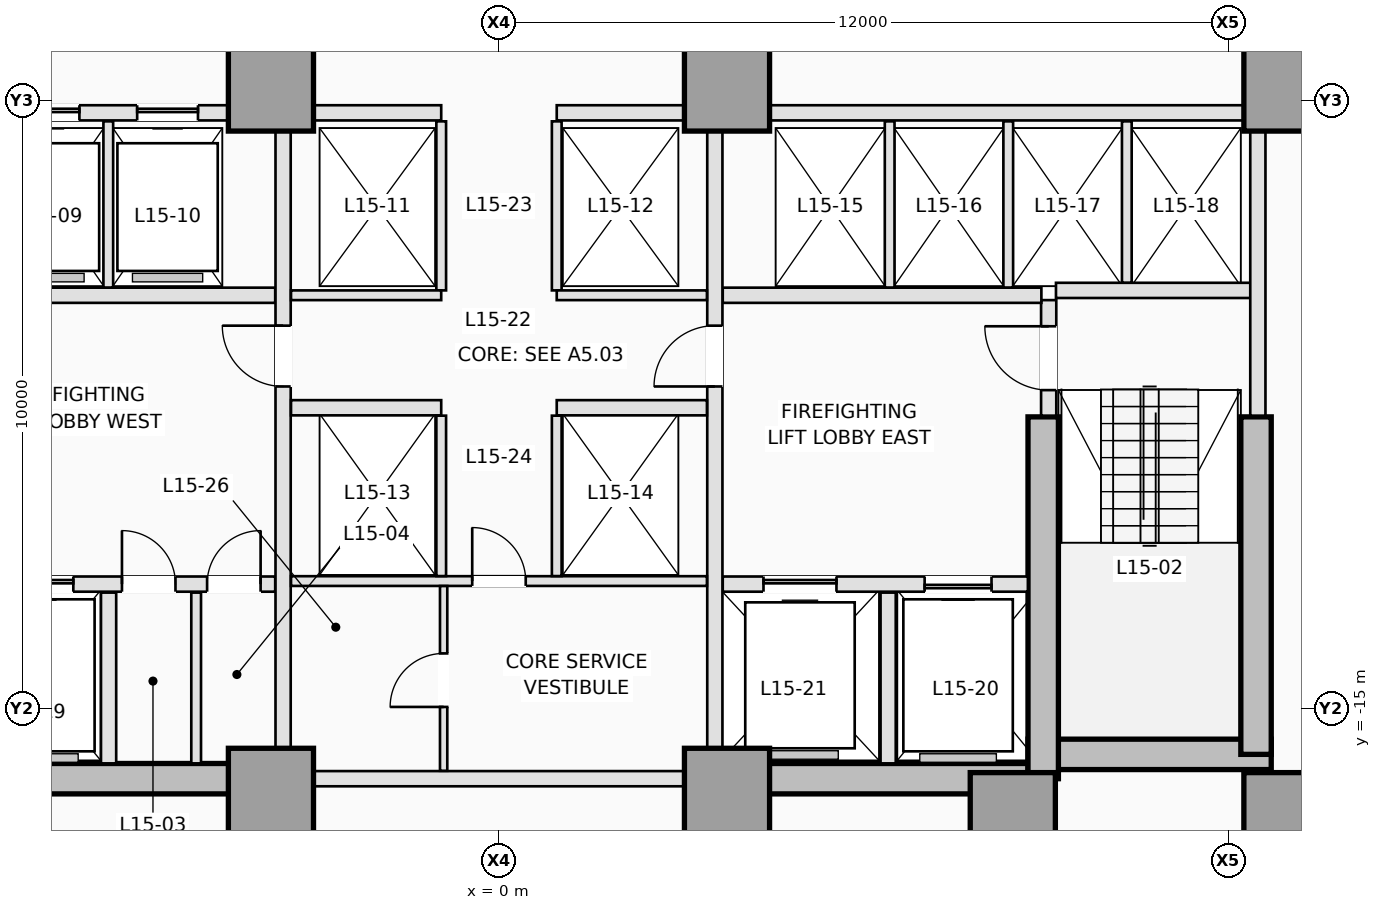
"""IFC4 building model, lengths in metres.
Left out: names, types, materials, properties, quantities, classifications, styles, units other than length and angle.
Written with IfcOpenShell. Run it as: python <this file> out.ifc"""

import sys

from ifc_helpers import new_model, si_unit, direction, frame, frame_2d, origin, origin_2d, place, context, subcontext, project, spatial, rectangle, extrude, element, fill, save


model = new_model("IFC4")
c1 = context("Model", 3, precision=1e-05, world=origin(), true_north=direction((0.0, 1.0)))
c2 = subcontext(c1, "Body", "Model", "MODEL_VIEW")
j1 = project(units=[si_unit("LENGTHUNIT", "METRE"), si_unit("PLANEANGLEUNIT", "RADIAN")], contexts=[c1])
p1 = place(None, origin())
s1 = spatial("IfcSite", under=j1, at=p1, CompositionType="ELEMENT")
p2 = place(p1, origin())
s2 = spatial("IfcBuilding", under=s1, at=p2, CompositionType="ELEMENT")
p3 = place(p2, frame((0.0, 0.0, 59.1)))
s3 = spatial("IfcBuildingStorey", under=s2, at=p3, CompositionType="ELEMENT", Elevation=59.1)
for number, where, z_axis, x_axis in (
    (1, (-8.95, -16.15, 0.0), (0.0, 0.0, 1.0), (1.0, 0.0, 0.0)),
    (2, (3.75, -16.15, 0.0), (0.0, 0.0, 1.0), (1.0, 0.0, 0.0)),
):
    element("IfcWall", number, at=place(p3, frame(where, z_axis=z_axis, x_axis=x_axis)), inside=s3, PredefinedType="SHEAR", context=c2, shape_type="SweptSolid", body=[
        extrude(rectangle(XDim=5.2, YDim=0.5, at=frame_2d((2.6, 0.0))), origin(), (0.0, 0.0, 1.0), 3.5),
    ])
p4 = place(p3, frame((8.7, -15.75, 0.0), z_axis=(0.0, 0.0, 1.0), x_axis=(1.0, 0.0, 0.0)))
e3 = element("IfcWall", 3, at=p4, inside=s3, PredefinedType="SHEAR", context=c2, shape_type="SweptSolid", body=[
    extrude(rectangle(XDim=4.0, YDim=0.5, at=frame_2d((2.0, 0.0))), origin(), (0.0, 0.0, 1.0), 3.5),
])
p5 = place(p3, frame((12.45, -15.75, 0.0), z_axis=(0.0, 0.0, 1.0), x_axis=(0.0, 1.0, 0.0)))
e4 = element("IfcWall", 4, at=p5, inside=s3, PredefinedType="SHEAR", context=c2, shape_type="SweptSolid", body=[
    extrude(rectangle(XDim=5.55, YDim=0.5, at=frame_2d((2.775, 0.0))), origin(), (0.0, 0.0, 1.0), 3.5),
])
p6 = place(p3, frame((8.95, -16.15, 0.0), z_axis=(0.0, 0.0, 1.0), x_axis=(0.0, 1.0, 0.0)))
e5 = element("IfcWall", 5, at=p6, inside=s3, PredefinedType="SHEAR", context=c2, shape_type="SweptSolid", body=[
    extrude(rectangle(XDim=5.95, YDim=0.5, at=frame_2d((2.975, 0.0))), origin(), (0.0, 0.0, 1.0), 3.5),
])
for number, where, z_axis, x_axis in (
    (6, (-3.75, -16.35, 0.0), (0.0, 0.0, 1.0), (1.0, 0.0, 0.0)),
    (7, (3.75, -16.35, 0.0), (0.0, 0.0, 1.0), (1.0, 0.0, 0.0)),
    (8, (8.45, -16.75, 0.0), (0.0, 0.0, 1.0), (1.0, 0.0, 0.0)),
    (9, (12.95, -16.75, 0.0), (0.0, 0.0, 1.0), (1.0, 0.0, 0.0)),
    (10, (-3.75, -4.8, 0.0), (0.0, 0.0, 1.0), (1.0, 0.0, 0.0)),
    (11, (3.75, -4.8, 0.0), (0.0, 0.0, 1.0), (1.0, 0.0, 0.0)),
    (12, (12.95, -4.8, 0.0), (0.0, 0.0, 1.0), (1.0, 0.0, 0.0)),
):
    element("IfcColumn", number, at=place(p3, frame(where, z_axis=z_axis, x_axis=x_axis)), inside=s3, PredefinedType="COLUMN", context=c2, shape_type="SweptSolid", body=[
        extrude(rectangle(XDim=1.4, YDim=1.4, at=origin_2d()), origin(), (0.0, 0.0, 1.0), 3.5),
    ])
p7 = place(p3, frame((9.04, -10.18, 0.0), z_axis=(0.0, 0.0, 1.0), x_axis=(0.0, 1.0, 0.0)))
e13 = element("IfcWall", 13, at=p7, inside=s3, PredefinedType="PARTITIONING", context=c2, shape_type="SweptSolid", body=[
    extrude(rectangle(XDim=1.9, YDim=0.25, at=frame_2d((0.95, 0.0))), origin(), (0.0, 0.0, 1.0), 3.25),
])
p8 = place(p7, frame((0.42, 0.0, 0.0)))
e14 = element("IfcOpeningElement", 14, at=p8, cuts=e13, PredefinedType="OPENING", context=c2, shape_type="SweptSolid", body=[
    extrude(rectangle(XDim=1.05, YDim=2.15, at=frame_2d((0.525, 1.075))), frame((0.0, 0.135, 0.0), z_axis=(0.0, -1.0, 0.0), x_axis=(1.0, 0.0, 0.0)), (0.0, 0.0, 1.0), 0.27),
])
p9 = place(p3, frame((9.16, -8.12, 0.0), z_axis=(0.0, 0.0, 1.0), x_axis=(1.0, 0.0, 0.0)))
e15 = element("IfcWall", 15, at=p9, inside=s3, PredefinedType="PARTITIONING", context=c2, shape_type="SweptSolid", body=[
    extrude(rectangle(XDim=3.22, YDim=0.25, at=frame_2d((1.61, 0.0))), origin(), (0.0, 0.0, 1.0), 3.25),
])
p10 = place(p3, frame((12.48, -10.18, 0.0), z_axis=(0.0, 0.0, 1.0), x_axis=(0.0, 1.0, 0.0)))
e16 = element("IfcWall", 16, at=p10, inside=s3, PredefinedType="PARTITIONING", context=c2, shape_type="SweptSolid", body=[
    extrude(rectangle(XDim=4.678, YDim=0.25, at=frame_2d((2.339, 0.0))), origin(), (0.0, 0.0, 1.0), 3.25),
])
p11 = place(p3, frame((-8.698, -12.95, 0.0), z_axis=(0.0, 0.0, 1.0), x_axis=(1.0, 0.0, 0.0)))
e17 = element("IfcWall", 17, at=p11, inside=s3, PredefinedType="PARTITIONING", context=c2, shape_type="SweptSolid", body=[
    extrude(rectangle(XDim=5.018, YDim=0.25, at=frame_2d((2.509, 0.0))), origin(), (0.0, 0.0, 1.0), 3.25),
])
p12 = place(p11, frame((0.598, 0.0, 0.0)))
e18 = element("IfcOpeningElement", 18, at=p12, cuts=e17, PredefinedType="OPENING", context=c2, shape_type="SweptSolid", body=[
    extrude(rectangle(XDim=1.1, YDim=2.15, at=frame_2d((0.55, 1.075))), frame((0.0, 0.135, 0.0), z_axis=(0.0, -1.0, 0.0), x_axis=(1.0, 0.0, 0.0)), (0.0, 0.0, 1.0), 0.27),
])
p13 = place(p11, frame((2.498, 0.0, 0.0)))
e19 = element("IfcOpeningElement", 19, at=p13, cuts=e17, PredefinedType="OPENING", context=c2, shape_type="SweptSolid", body=[
    extrude(rectangle(XDim=0.88, YDim=2.1, at=frame_2d((0.44, 1.05))), frame((0.0, 0.135, 0.0), z_axis=(0.0, -1.0, 0.0), x_axis=(1.0, 0.0, 0.0)), (0.0, 0.0, 1.0), 0.27),
])
p14 = place(p11, frame((3.898, 0.0, 0.0)))
e20 = element("IfcOpeningElement", 20, at=p14, cuts=e17, PredefinedType="OPENING", context=c2, shape_type="SweptSolid", body=[
    extrude(rectangle(XDim=0.88, YDim=2.1, at=frame_2d((0.44, 1.05))), frame((0.0, 0.135, 0.0), z_axis=(0.0, -1.0, 0.0), x_axis=(1.0, 0.0, 0.0)), (0.0, 0.0, 1.0), 0.27),
])
p15 = place(p3, frame((3.68, -12.95, 0.0), z_axis=(0.0, 0.0, 1.0), x_axis=(1.0, 0.0, 0.0)))
e21 = element("IfcWall", 21, at=p15, inside=s3, PredefinedType="PARTITIONING", context=c2, shape_type="SweptSolid", body=[
    extrude(rectangle(XDim=5.018, YDim=0.25, at=frame_2d((2.509, 0.0))), origin(), (0.0, 0.0, 1.0), 3.25),
])
p16 = place(p15, frame((3.32, 0.0, 0.0)))
e22 = element("IfcOpeningElement", 22, at=p16, cuts=e21, PredefinedType="OPENING", context=c2, shape_type="SweptSolid", body=[
    extrude(rectangle(XDim=1.1, YDim=2.15, at=frame_2d((0.55, 1.075))), frame((0.0, 0.135, 0.0), z_axis=(0.0, -1.0, 0.0), x_axis=(1.0, 0.0, 0.0)), (0.0, 0.0, 1.0), 0.27),
])
p17 = place(p15, frame((0.67, 0.0, 0.0)))
e23 = element("IfcOpeningElement", 23, at=p17, cuts=e21, PredefinedType="OPENING", context=c2, shape_type="SweptSolid", body=[
    extrude(rectangle(XDim=1.2, YDim=2.15, at=frame_2d((0.6, 1.075))), frame((0.0, 0.135, 0.0), z_axis=(0.0, -1.0, 0.0), x_axis=(1.0, 0.0, 0.0)), (0.0, 0.0, 1.0), 0.27),
])
p18 = place(p3, frame((-6.42, -15.898, 0.0), z_axis=(0.0, 0.0, 1.0), x_axis=(0.0, 1.0, 0.0)))
e24 = element("IfcWall", 24, at=p18, inside=s3, PredefinedType="PARTITIONING", context=c2, shape_type="SweptSolid", body=[
    extrude(rectangle(XDim=2.808, YDim=0.25, at=frame_2d((1.404, 0.0))), origin(), (0.0, 0.0, 1.0), 3.25),
])
p19 = place(p3, frame((-4.98, -15.898, 0.0), z_axis=(0.0, 0.0, 1.0), x_axis=(0.0, 1.0, 0.0)))
e25 = element("IfcWall", 25, at=p19, inside=s3, PredefinedType="PARTITIONING", context=c2, shape_type="SweptSolid", body=[
    extrude(rectangle(XDim=2.808, YDim=0.16, at=frame_2d((1.404, 0.0))), origin(), (0.0, 0.0, 1.0), 3.25),
])
p20 = place(p3, frame((6.4, -15.898, 0.0), z_axis=(0.0, 0.0, 1.0), x_axis=(0.0, 1.0, 0.0)))
e26 = element("IfcWall", 26, at=p20, inside=s3, PredefinedType="PARTITIONING", context=c2, shape_type="SweptSolid", body=[
    extrude(rectangle(XDim=2.808, YDim=0.25, at=frame_2d((1.404, 0.0))), origin(), (0.0, 0.0, 1.0), 3.25),
])
for number, where, z_axis, x_axis in (
    (27, (-8.92, -8.2, 0.0), (0.0, 0.0, 1.0), (1.0, 0.0, 0.0)),
    (28, (3.68, -8.2, 0.0), (0.0, 0.0, 1.0), (1.0, 0.0, 0.0)),
):
    element("IfcWall", number, at=place(p3, frame(where, z_axis=z_axis, x_axis=x_axis)), inside=s3, PredefinedType="PARTITIONING", context=c2, shape_type="SweptSolid", body=[
        extrude(rectangle(XDim=5.24, YDim=0.25, at=frame_2d((2.62, 0.0))), origin(), (0.0, 0.0, 1.0), 3.25),
    ])
p21 = place(p3, frame((-3.55, -15.648, 0.0), z_axis=(0.0, 0.0, 1.0), x_axis=(0.0, 1.0, 0.0)))
e29 = element("IfcWall", 29, at=p21, inside=s3, PredefinedType="PARTITIONING", context=c2, shape_type="SweptSolid", body=[
    extrude(rectangle(XDim=10.146, YDim=0.25, at=frame_2d((5.073, 0.0))), origin(), (0.0, 0.0, 1.0), 3.25),
])
p22 = place(p21, frame((5.948, 0.0, 0.0)))
e30 = element("IfcOpeningElement", 30, at=p22, cuts=e29, PredefinedType="OPENING", context=c2, shape_type="SweptSolid", body=[
    extrude(rectangle(XDim=1.0, YDim=2.15, at=frame_2d((0.5, 1.075))), frame((0.0, 0.135, 0.0), z_axis=(0.0, -1.0, 0.0), x_axis=(1.0, 0.0, 0.0)), (0.0, 0.0, 1.0), 0.27),
])
p23 = place(p3, frame((3.55, -15.648, 0.0), z_axis=(0.0, 0.0, 1.0), x_axis=(0.0, 1.0, 0.0)))
e31 = element("IfcWall", 31, at=p23, inside=s3, PredefinedType="PARTITIONING", context=c2, shape_type="SweptSolid", body=[
    extrude(rectangle(XDim=10.146, YDim=0.25, at=frame_2d((5.073, 0.0))), origin(), (0.0, 0.0, 1.0), 3.25),
])
p24 = place(p23, frame((5.948, 0.0, 0.0)))
e32 = element("IfcOpeningElement", 32, at=p24, cuts=e31, PredefinedType="OPENING", context=c2, shape_type="SweptSolid", body=[
    extrude(rectangle(XDim=1.0, YDim=2.15, at=frame_2d((0.5, 1.075))), frame((0.0, 0.135, 0.0), z_axis=(0.0, -1.0, 0.0), x_axis=(1.0, 0.0, 0.0)), (0.0, 0.0, 1.0), 0.27),
])
p25 = place(p3, frame((-12.248, -5.2, 0.0), z_axis=(0.0, 0.0, 1.0), x_axis=(1.0, 0.0, 0.0)))
e33 = element("IfcWall", 33, at=p25, inside=s3, PredefinedType="PARTITIONING", context=c2, shape_type="SweptSolid", body=[
    extrude(rectangle(XDim=7.796, YDim=0.25, at=frame_2d((3.898, 0.0))), origin(), (0.0, 0.0, 1.0), 3.25),
])
p26 = place(p25, frame((0.448, 0.0, 0.0)))
e34 = element("IfcOpeningElement", 34, at=p26, cuts=e33, PredefinedType="OPENING", context=c2, shape_type="SweptSolid", body=[
    extrude(rectangle(XDim=1.0, YDim=2.15, at=frame_2d((0.5, 1.075))), frame((0.0, 0.135, 0.0), z_axis=(0.0, -1.0, 0.0), x_axis=(1.0, 0.0, 0.0)), (0.0, 0.0, 1.0), 0.27),
])
p27 = place(p25, frame((2.398, 0.0, 0.0)))
e35 = element("IfcOpeningElement", 35, at=p27, cuts=e33, PredefinedType="OPENING", context=c2, shape_type="SweptSolid", body=[
    extrude(rectangle(XDim=1.0, YDim=2.15, at=frame_2d((0.5, 1.075))), frame((0.0, 0.135, 0.0), z_axis=(0.0, -1.0, 0.0), x_axis=(1.0, 0.0, 0.0)), (0.0, 0.0, 1.0), 0.27),
])
p28 = place(p25, frame((4.348, 0.0, 0.0)))
e36 = element("IfcOpeningElement", 36, at=p28, cuts=e33, PredefinedType="OPENING", context=c2, shape_type="SweptSolid", body=[
    extrude(rectangle(XDim=1.0, YDim=2.15, at=frame_2d((0.5, 1.075))), frame((0.0, 0.135, 0.0), z_axis=(0.0, -1.0, 0.0), x_axis=(1.0, 0.0, 0.0)), (0.0, 0.0, 1.0), 0.27),
])
p29 = place(p25, frame((6.298, 0.0, 0.0)))
e37 = element("IfcOpeningElement", 37, at=p29, cuts=e33, PredefinedType="OPENING", context=c2, shape_type="SweptSolid", body=[
    extrude(rectangle(XDim=1.0, YDim=2.15, at=frame_2d((0.5, 1.075))), frame((0.0, 0.135, 0.0), z_axis=(0.0, -1.0, 0.0), x_axis=(1.0, 0.0, 0.0)), (0.0, 0.0, 1.0), 0.27),
])
p30 = place(p3, frame((4.452, -5.2, 0.0), z_axis=(0.0, 0.0, 1.0), x_axis=(1.0, 0.0, 0.0)))
e38 = element("IfcWall", 38, at=p30, inside=s3, PredefinedType="PARTITIONING", context=c2, shape_type="SweptSolid", body=[
    extrude(rectangle(XDim=7.796, YDim=0.25, at=frame_2d((3.898, 0.0))), origin(), (0.0, 0.0, 1.0), 3.25),
])
for number, where, z_axis, x_axis in (
    (39, (-3.048, -5.2, 0.0), (0.0, 0.0, 1.0), (1.0, 0.0, 0.0)),
    (40, (0.95, -5.2, 0.0), (0.0, 0.0, 1.0), (1.0, 0.0, 0.0)),
):
    element("IfcWall", number, at=place(p3, frame(where, z_axis=z_axis, x_axis=x_axis)), inside=s3, PredefinedType="PARTITIONING", context=c2, shape_type="SweptSolid", body=[
        extrude(rectangle(XDim=2.098, YDim=0.25, at=frame_2d((1.049, 0.0))), origin(), (0.0, 0.0, 1.0), 3.25),
    ])
for number, where, z_axis, x_axis in (
    (41, (-6.425, -8.073, 0.0), (0.0, 0.0, 1.0), (0.0, 1.0, 0.0)),
    (42, (6.425, -8.073, 0.0), (0.0, 0.0, 1.0), (0.0, 1.0, 0.0)),
    (43, (8.375, -8.073, 0.0), (0.0, 0.0, 1.0), (0.0, 1.0, 0.0)),
):
    element("IfcWall", number, at=place(p3, frame(where, z_axis=z_axis, x_axis=x_axis)), inside=s3, PredefinedType="PARTITIONING", context=c2, shape_type="SweptSolid", body=[
        extrude(rectangle(XDim=2.733, YDim=0.16, at=frame_2d((1.366, 0.0))), origin(), (0.0, 0.0, 1.0), 3.25),
    ])
p31 = place(p3, frame((10.325, -7.993, 0.0), z_axis=(0.0, 0.0, 1.0), x_axis=(0.0, 1.0, 0.0)))
e44 = element("IfcWall", 44, at=p31, inside=s3, PredefinedType="PARTITIONING", context=c2, shape_type="SweptSolid", body=[
    extrude(rectangle(XDim=2.653, YDim=0.16, at=frame_2d((1.326, 0.0))), origin(), (0.0, 0.0, 1.0), 3.25),
])
p32 = place(p3, frame((-3.048, -16.15, 0.0), z_axis=(0.0, 0.0, 1.0), x_axis=(1.0, 0.0, 0.0)))
e45 = element("IfcWall", 45, at=p32, inside=s3, PredefinedType="PARTITIONING", context=c2, shape_type="SweptSolid", body=[
    extrude(rectangle(XDim=6.096, YDim=0.25, at=frame_2d((3.048, 0.0))), origin(), (0.0, 0.0, 1.0), 2.3),
])
for number, where, z_axis, x_axis in (
    (46, (-0.95, -8.12, 0.0), (0.0, 0.0, 1.0), (0.0, 1.0, 0.0)),
    (47, (0.95, -8.12, 0.0), (0.0, 0.0, 1.0), (0.0, 1.0, 0.0)),
):
    element("IfcWall", number, at=place(p3, frame(where, z_axis=z_axis, x_axis=x_axis)), inside=s3, PredefinedType="PARTITIONING", context=c2, shape_type="SweptSolid", body=[
        extrude(rectangle(XDim=2.78, YDim=0.16, at=frame_2d((1.39, 0.0))), origin(), (0.0, 0.0, 1.0), 3.25),
    ])
for number, where, z_axis, x_axis in (
    (48, (-3.42, -8.2, 0.0), (0.0, 0.0, 1.0), (1.0, 0.0, 0.0)),
    (49, (0.95, -8.2, 0.0), (0.0, 0.0, 1.0), (1.0, 0.0, 0.0)),
):
    element("IfcWall", number, at=place(p3, frame(where, z_axis=z_axis, x_axis=x_axis)), inside=s3, PredefinedType="PARTITIONING", context=c2, shape_type="SweptSolid", body=[
        extrude(rectangle(XDim=2.47, YDim=0.16, at=frame_2d((1.235, 0.0))), origin(), (0.0, 0.0, 1.0), 3.25),
    ])
for number, where, z_axis, x_axis in (
    (50, (-3.42, -10.05, 0.0), (0.0, 0.0, 1.0), (1.0, 0.0, 0.0)),
    (51, (0.95, -10.05, 0.0), (0.0, 0.0, 1.0), (1.0, 0.0, 0.0)),
):
    element("IfcWall", number, at=place(p3, frame(where, z_axis=z_axis, x_axis=x_axis)), inside=s3, PredefinedType="PARTITIONING", context=c2, shape_type="SweptSolid", body=[
        extrude(rectangle(XDim=2.47, YDim=0.25, at=frame_2d((1.235, 0.0))), origin(), (0.0, 0.0, 1.0), 3.25),
    ])
p33 = place(p3, frame((-3.42, -12.9, 0.0), z_axis=(0.0, 0.0, 1.0), x_axis=(1.0, 0.0, 0.0)))
e52 = element("IfcWall", 52, at=p33, inside=s3, PredefinedType="PARTITIONING", context=c2, shape_type="SweptSolid", body=[
    extrude(rectangle(XDim=6.84, YDim=0.16, at=frame_2d((3.42, 0.0))), origin(), (0.0, 0.0, 1.0), 3.25),
])
p34 = place(p33, frame((2.98, 0.0, 0.0)))
e53 = element("IfcOpeningElement", 53, at=p34, cuts=e52, PredefinedType="OPENING", context=c2, shape_type="SweptSolid", body=[
    extrude(rectangle(XDim=0.88, YDim=2.12, at=frame_2d((0.44, 1.06))), frame((0.0, 0.09, 0.0), z_axis=(0.0, -1.0, 0.0), x_axis=(1.0, 0.0, 0.0)), (0.0, 0.0, 1.0), 0.18),
])
for number, where, z_axis, x_axis in (
    (54, (-0.95, -12.818, 0.0), (0.0, 0.0, 1.0), (0.0, 1.0, 0.0)),
    (55, (0.95, -12.818, 0.0), (0.0, 0.0, 1.0), (0.0, 1.0, 0.0)),
):
    element("IfcWall", number, at=place(p3, frame(where, z_axis=z_axis, x_axis=x_axis)), inside=s3, PredefinedType="PARTITIONING", context=c2, shape_type="SweptSolid", body=[
        extrude(rectangle(XDim=2.638, YDim=0.16, at=frame_2d((1.319, 0.0))), origin(), (0.0, 0.0, 1.0), 3.25),
    ])
p35 = place(p3, frame((-0.91, -16.02, 0.0), z_axis=(0.0, 0.0, 1.0), x_axis=(0.0, 1.0, 0.0)))
e56 = element("IfcWall", 56, at=p35, inside=s3, PredefinedType="PARTITIONING", context=c2, shape_type="SweptSolid", body=[
    extrude(rectangle(XDim=3.038, YDim=0.12, at=frame_2d((1.519, 0.0))), origin(), (0.0, 0.0, 1.0), 3.25),
])
p36 = place(p35, frame((1.05, 0.0, 0.0)))
e57 = element("IfcOpeningElement", 57, at=p36, cuts=e56, PredefinedType="OPENING", context=c2, shape_type="SweptSolid", body=[
    extrude(rectangle(XDim=0.88, YDim=2.12, at=frame_2d((0.44, 1.06))), frame((0.0, 0.07, 0.0), z_axis=(0.0, -1.0, 0.0), x_axis=(1.0, 0.0, 0.0)), (0.0, 0.0, 1.0), 0.14),
])
p37 = place(p28, origin())
e58 = element("IfcDoor", 58, at=p37, inside=s3, OperationType="SLIDING_TO_LEFT", PredefinedType="DOOR", context=c2, shape_type="SweptSolid", body=[
    extrude(rectangle(XDim=1.0, YDim=2.15, at=frame_2d((0.5, 1.075))), frame((0.0, 0.025, 0.0), z_axis=(0.0, -1.0, 0.0), x_axis=(1.0, 0.0, 0.0)), (0.0, 0.0, 1.0), 0.05),
])
fill(e36, e58)
p38 = place(p29, origin())
e59 = element("IfcDoor", 59, at=p38, inside=s3, OperationType="SLIDING_TO_LEFT", PredefinedType="DOOR", context=c2, shape_type="SweptSolid", body=[
    extrude(rectangle(XDim=1.0, YDim=2.15, at=frame_2d((0.5, 1.075))), frame((0.0, 0.025, 0.0), z_axis=(0.0, -1.0, 0.0), x_axis=(1.0, 0.0, 0.0)), (0.0, 0.0, 1.0), 0.05),
])
fill(e37, e59)
p39 = place(p12, origin())
e60 = element("IfcDoor", 60, at=p39, inside=s3, OperationType="SLIDING_TO_LEFT", PredefinedType="DOOR", context=c2, shape_type="SweptSolid", body=[
    extrude(rectangle(XDim=1.1, YDim=2.15, at=frame_2d((0.55, 1.075))), frame((0.0, 0.025, 0.0), z_axis=(0.0, -1.0, 0.0), x_axis=(1.0, 0.0, 0.0)), (0.0, 0.0, 1.0), 0.05),
])
fill(e18, e60)
p40 = place(p16, origin())
e61 = element("IfcDoor", 61, at=p40, inside=s3, OperationType="SLIDING_TO_RIGHT", PredefinedType="DOOR", context=c2, shape_type="SweptSolid", body=[
    extrude(rectangle(XDim=1.1, YDim=2.15, at=frame_2d((0.55, 1.075))), frame((0.0, 0.025, 0.0), z_axis=(0.0, -1.0, 0.0), x_axis=(1.0, 0.0, 0.0)), (0.0, 0.0, 1.0), 0.05),
])
fill(e22, e61)
p41 = place(p17, origin())
e62 = element("IfcDoor", 62, at=p41, inside=s3, OperationType="SLIDING_TO_LEFT", PredefinedType="DOOR", context=c2, shape_type="SweptSolid", body=[
    extrude(rectangle(XDim=1.2, YDim=2.15, at=frame_2d((0.6, 1.075))), frame((0.0, 0.025, 0.0), z_axis=(0.0, -1.0, 0.0), x_axis=(1.0, 0.0, 0.0)), (0.0, 0.0, 1.0), 0.05),
])
fill(e23, e62)
p42 = place(p8, origin())
e63 = element("IfcDoor", 63, at=p42, inside=s3, OperationType="SINGLE_SWING_RIGHT", PredefinedType="DOOR", context=c2, shape_type="SweptSolid", body=[
    extrude(rectangle(XDim=1.05, YDim=2.15, at=frame_2d((0.525, 1.075))), frame((0.0, 0.025, 0.0), z_axis=(0.0, -1.0, 0.0), x_axis=(1.0, 0.0, 0.0)), (0.0, 0.0, 1.0), 0.05),
])
fill(e14, e63)
p43 = place(p13, origin())
e64 = element("IfcDoor", 64, at=p43, inside=s3, OperationType="SINGLE_SWING_LEFT", PredefinedType="TRAPDOOR", context=c2, shape_type="SweptSolid", body=[
    extrude(rectangle(XDim=0.88, YDim=2.1, at=frame_2d((0.44, 1.05))), frame((0.0, 0.025, 0.0), z_axis=(0.0, -1.0, 0.0), x_axis=(1.0, 0.0, 0.0)), (0.0, 0.0, 1.0), 0.05),
])
fill(e19, e64)
p44 = place(p14, origin())
e65 = element("IfcDoor", 65, at=p44, inside=s3, OperationType="SINGLE_SWING_RIGHT", PredefinedType="TRAPDOOR", context=c2, shape_type="SweptSolid", body=[
    extrude(rectangle(XDim=0.88, YDim=2.1, at=frame_2d((0.44, 1.05))), frame((0.0, 0.025, 0.0), z_axis=(0.0, -1.0, 0.0), x_axis=(1.0, 0.0, 0.0)), (0.0, 0.0, 1.0), 0.05),
])
fill(e20, e65)
p45 = place(p22, origin())
e66 = element("IfcDoor", 66, at=p45, inside=s3, OperationType="SINGLE_SWING_RIGHT", PredefinedType="DOOR", context=c2, shape_type="SweptSolid", body=[
    extrude(rectangle(XDim=1.0, YDim=2.15, at=frame_2d((0.5, 1.075))), frame((0.0, 0.025, 0.0), z_axis=(0.0, -1.0, 0.0), x_axis=(1.0, 0.0, 0.0)), (0.0, 0.0, 1.0), 0.05),
])
fill(e30, e66)
p46 = place(p24, origin())
e67 = element("IfcDoor", 67, at=p46, inside=s3, OperationType="SINGLE_SWING_LEFT", PredefinedType="DOOR", context=c2, shape_type="SweptSolid", body=[
    extrude(rectangle(XDim=1.0, YDim=2.15, at=frame_2d((0.5, 1.075))), frame((0.0, 0.025, 0.0), z_axis=(0.0, -1.0, 0.0), x_axis=(1.0, 0.0, 0.0)), (0.0, 0.0, 1.0), 0.05),
])
fill(e32, e67)
p47 = place(p34, origin())
e68 = element("IfcDoor", 68, at=p47, inside=s3, OperationType="SINGLE_SWING_LEFT", PredefinedType="DOOR", context=c2, shape_type="SweptSolid", body=[
    extrude(rectangle(XDim=0.88, YDim=2.12, at=frame_2d((0.44, 1.06))), frame((0.0, 0.025, 0.0), z_axis=(0.0, -1.0, 0.0), x_axis=(1.0, 0.0, 0.0)), (0.0, 0.0, 1.0), 0.05),
])
fill(e53, e68)
p48 = place(p36, origin())
e69 = element("IfcDoor", 69, at=p48, inside=s3, OperationType="SINGLE_SWING_LEFT", PredefinedType="DOOR", context=c2, shape_type="SweptSolid", body=[
    extrude(rectangle(XDim=0.88, YDim=2.12, at=frame_2d((0.44, 1.06))), frame((0.0, 0.025, 0.0), z_axis=(0.0, -1.0, 0.0), x_axis=(1.0, 0.0, 0.0)), (0.0, 0.0, 1.0), 0.05),
])
fill(e57, e69)
save(model, sys.argv[1])
